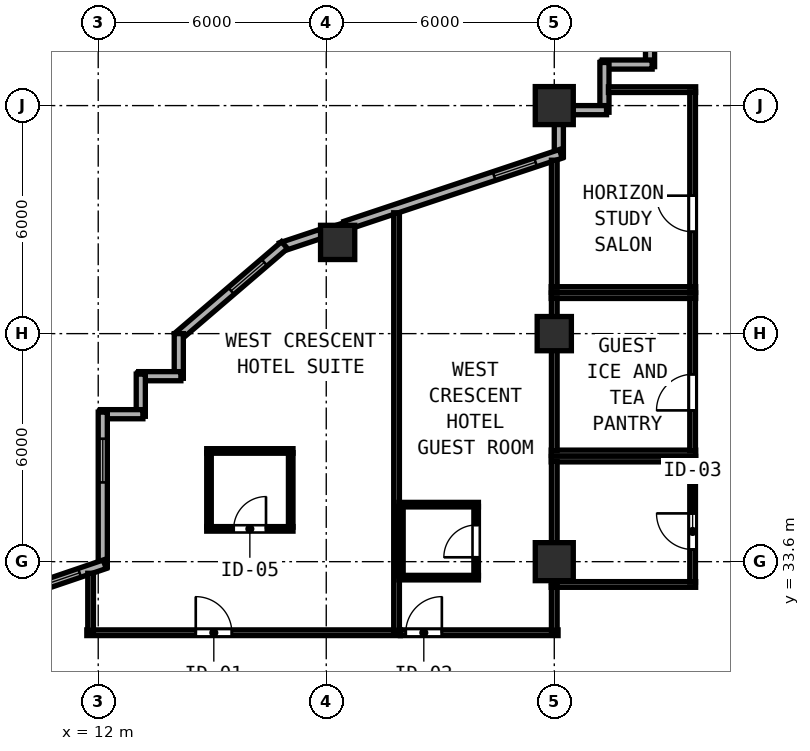
"""IFC4 building model, lengths in metres.
Left out: names, types, materials, properties, quantities, classifications, styles, units other than length and angle.
Written with IfcOpenShell. Run it as: python <this file> out.ifc"""

import sys

from ifc_helpers import new_model, si_unit, direction, frame, frame_2d, origin, origin_2d, place, context, subcontext, project, spatial, rectangle, hollow_rectangle, extrude, element, fill, save


model = new_model("IFC4")
c1 = context("Model", 3, precision=1e-05, world=origin(), true_north=direction((0.0, 1.0)))
c2 = subcontext(c1, "Body", "Model", "MODEL_VIEW")
j1 = project(units=[si_unit("LENGTHUNIT", "METRE"), si_unit("PLANEANGLEUNIT", "RADIAN")], contexts=[c1])
p1 = place(None, origin())
s1 = spatial("IfcSite", under=j1, at=p1, CompositionType="ELEMENT")
p2 = place(p1, origin())
s2 = spatial("IfcBuilding", under=s1, at=p2, CompositionType="ELEMENT")
p3 = place(p2, frame((0.0, 0.0, 106.0)))
s3 = spatial("IfcBuildingStorey", under=s2, at=p3, CompositionType="ELEMENT", Elevation=106.0)
for number, where, z_axis, x_axis in (
    (1, (24.0, 33.6, 0.0), (0.0, 0.0, 1.0), (1.0, 0.0, 0.0)),
    (2, (24.0, 45.6, 0.0), (0.0, 0.0, 1.0), (1.0, 0.0, 0.0)),
):
    element("IfcColumn", number, at=place(p3, frame(where, z_axis=z_axis, x_axis=x_axis)), inside=s3, PredefinedType="COLUMN", context=c2, shape_type="SweptSolid", body=[
        extrude(hollow_rectangle(XDim=1.0, YDim=1.0, WallThickness=0.038, at=origin_2d()), origin(), (0.0, 0.0, 1.0), 3.8),
    ])
for number, where, z_axis, x_axis in (
    (3, (24.0, 39.6, 0.0), (0.0, 0.0, 1.0), (1.0, 0.0, 0.0)),
    (4, (18.3, 42.0, 0.0), (0.0, 0.0, 1.0), (1.0, 0.0, 0.0)),
):
    element("IfcColumn", number, at=place(p3, frame(where, z_axis=z_axis, x_axis=x_axis)), inside=s3, PredefinedType="COLUMN", context=c2, shape_type="SweptSolid", body=[
        extrude(hollow_rectangle(XDim=0.9, YDim=0.9, WallThickness=0.034, at=origin_2d()), origin(), (0.0, 0.0, 1.0), 3.8),
    ])
p4 = place(p3, frame((26.52, 47.995, 0.0), z_axis=(0.0, 0.0, 1.0), x_axis=(0.0, -1.0, 0.0)))
e5 = element("IfcWall", 5, at=p4, inside=s3, PredefinedType="SOLIDWALL", context=c2, shape_type="SweptSolid", body=[
    extrude(rectangle(XDim=1.37, YDim=0.24, at=frame_2d((0.685, 0.0))), origin(), (0.0, 0.0, 1.0), 3.6),
])
for number, where, z_axis, x_axis in (
    (6, (26.575, 46.68, 0.0), (0.0, 0.0, 1.0), (-1.0, 0.0, 0.0)),
    (7, (25.32, 46.735, 0.0), (0.0, 0.0, 1.0), (0.0, -1.0, 0.0)),
):
    element("IfcWall", number, at=place(p3, frame(where, z_axis=z_axis, x_axis=x_axis)), inside=s3, PredefinedType="SOLIDWALL", context=c2, shape_type="SweptSolid", body=[
        extrude(rectangle(XDim=1.31, YDim=0.24, at=frame_2d((0.655, 0.0))), origin(), (0.0, 0.0, 1.0), 3.6),
    ])
p5 = place(p3, frame((25.375, 45.48, 0.0), z_axis=(0.0, 0.0, 1.0), x_axis=(-1.0, 0.0, 0.0)))
e8 = element("IfcWall", 8, at=p5, inside=s3, PredefinedType="SOLIDWALL", context=c2, shape_type="SweptSolid", body=[
    extrude(rectangle(XDim=0.883, YDim=0.24, at=frame_2d((0.441, 0.0))), origin(), (0.0, 0.0, 1.0), 3.6),
])
p6 = place(p3, frame((24.12, 45.108, 0.0), z_axis=(0.0, 0.0, 1.0), x_axis=(0.0, -1.0, 0.0)))
e9 = element("IfcWall", 9, at=p6, inside=s3, PredefinedType="SOLIDWALL", context=c2, shape_type="SweptSolid", body=[
    extrude(rectangle(XDim=0.849, YDim=0.24, at=frame_2d((0.425, 0.0))), origin(), (0.0, 0.0, 1.0), 3.145),
])
p7 = place(p3, frame((24.172, 44.331, 0.0), z_axis=(0.0, 0.0, 1.0), x_axis=(-0.948683298051, -0.316227766017, 0.0)))
e10 = element("IfcWall", 10, at=p7, inside=s3, PredefinedType="SOLIDWALL", context=c2, shape_type="SweptSolid", body=[
    extrude(rectangle(XDim=5.973, YDim=0.24, at=frame_2d((2.987, 0.0))), origin(), (0.0, 0.0, 1.0), 3.145),
])
p8 = place(p7, frame((0.7, 0.0, 0.85)))
e11 = element("IfcOpeningElement", 11, at=p8, cuts=e10, PredefinedType="OPENING", context=c2, shape_type="SweptSolid", body=[
    extrude(rectangle(XDim=1.15, YDim=1.8, at=frame_2d((0.575, 0.9))), frame((0.0, 0.13, 0.0), z_axis=(0.0, -1.0, 0.0), x_axis=(1.0, 0.0, 0.0)), (0.0, 0.0, 1.0), 0.26),
])
p9 = place(p3, frame((17.858, 42.226, 0.0), z_axis=(0.0, 0.0, 1.0), x_axis=(-0.948639166064, -0.316360131194, 0.0)))
e12 = element("IfcWall", 12, at=p9, inside=s3, PredefinedType="SOLIDWALL", context=c2, shape_type="SweptSolid", body=[
    extrude(rectangle(XDim=1.107, YDim=0.24, at=frame_2d((0.553, 0.0))), origin(), (0.0, 0.0, 1.0), 3.6),
])
p10 = place(p3, frame((16.902, 41.929, 0.0), z_axis=(0.0, 0.0, 1.0), x_axis=(-0.759275136126, -0.650769750112, 0.0)))
e13 = element("IfcWall", 13, at=p10, inside=s3, PredefinedType="SOLIDWALL", context=c2, shape_type="SweptSolid", body=[
    extrude(rectangle(XDim=3.719, YDim=0.24, at=frame_2d((1.86, 0.0))), origin(), (0.0, 0.0, 1.0), 3.6),
])
p11 = place(p10, frame((0.7, 0.0, 0.85)))
e14 = element("IfcOpeningElement", 14, at=p11, cuts=e13, PredefinedType="OPENING", context=c2, shape_type="SweptSolid", body=[
    extrude(rectangle(XDim=1.15, YDim=1.8, at=frame_2d((0.575, 0.9))), frame((0.0, 0.13, 0.0), z_axis=(0.0, -1.0, 0.0), x_axis=(1.0, 0.0, 0.0)), (0.0, 0.0, 1.0), 0.26),
])
p12 = place(p3, frame((14.12, 39.6, 0.0), z_axis=(0.0, 0.0, 1.0), x_axis=(0.0, -1.0, 0.0)))
e15 = element("IfcWall", 15, at=p12, inside=s3, PredefinedType="SOLIDWALL", context=c2, shape_type="SweptSolid", body=[
    extrude(rectangle(XDim=1.175, YDim=0.24, at=frame_2d((0.587, 0.0))), origin(), (0.0, 0.0, 1.0), 3.6),
])
p13 = place(p3, frame((14.175, 38.48, 0.0), z_axis=(0.0, 0.0, 1.0), x_axis=(-1.0, 0.0, 0.0)))
e16 = element("IfcWall", 16, at=p13, inside=s3, PredefinedType="SOLIDWALL", context=c2, shape_type="SweptSolid", body=[
    extrude(rectangle(XDim=1.11, YDim=0.24, at=frame_2d((0.555, 0.0))), origin(), (0.0, 0.0, 1.0), 3.6),
])
p14 = place(p3, frame((13.12, 38.535, 0.0), z_axis=(0.0, 0.0, 1.0), x_axis=(0.0, -1.0, 0.0)))
e17 = element("IfcWall", 17, at=p14, inside=s3, PredefinedType="SOLIDWALL", context=c2, shape_type="SweptSolid", body=[
    extrude(rectangle(XDim=1.11, YDim=0.24, at=frame_2d((0.555, 0.0))), origin(), (0.0, 0.0, 1.0), 3.6),
])
p15 = place(p3, frame((13.175, 37.48, 0.0), z_axis=(0.0, 0.0, 1.0), x_axis=(-1.0, 0.0, 0.0)))
e18 = element("IfcWall", 18, at=p15, inside=s3, PredefinedType="SOLIDWALL", context=c2, shape_type="SweptSolid", body=[
    extrude(rectangle(XDim=1.11, YDim=0.24, at=frame_2d((0.555, 0.0))), origin(), (0.0, 0.0, 1.0), 3.6),
])
p16 = place(p3, frame((12.12, 37.535, 0.0), z_axis=(0.0, 0.0, 1.0), x_axis=(0.0, -1.0, 0.0)))
e19 = element("IfcWall", 19, at=p16, inside=s3, PredefinedType="SOLIDWALL", context=c2, shape_type="SweptSolid", body=[
    extrude(rectangle(XDim=4.076, YDim=0.24, at=frame_2d((2.038, 0.0))), origin(), (0.0, 0.0, 1.0), 3.6),
])
p17 = place(p16, frame((0.7, 0.0, 0.85)))
e20 = element("IfcOpeningElement", 20, at=p17, cuts=e19, PredefinedType="OPENING", context=c2, shape_type="SweptSolid", body=[
    extrude(rectangle(XDim=1.15, YDim=1.8, at=frame_2d((0.575, 0.9))), frame((0.0, 0.13, 0.0), z_axis=(0.0, -1.0, 0.0), x_axis=(1.0, 0.0, 0.0)), (0.0, 0.0, 1.0), 0.26),
])
p18 = place(p3, frame((12.172, 33.532, 0.0), z_axis=(0.0, 0.0, 1.0), x_axis=(-0.946792852546, -0.321843586805, 0.0)))
e21 = element("IfcWall", 21, at=p18, inside=s3, PredefinedType="SOLIDWALL", context=c2, shape_type="SweptSolid", body=[
    extrude(rectangle(XDim=7.622, YDim=0.24, at=frame_2d((3.811, 0.0))), origin(), (0.0, 0.0, 1.0), 3.6),
])
p19 = place(p18, frame((0.7, 0.0, 0.85)))
e22 = element("IfcOpeningElement", 22, at=p19, cuts=e21, PredefinedType="OPENING", context=c2, shape_type="SweptSolid", body=[
    extrude(rectangle(XDim=1.15, YDim=1.8, at=frame_2d((0.575, 0.9))), frame((0.0, 0.13, 0.0), z_axis=(0.0, -1.0, 0.0), x_axis=(1.0, 0.0, 0.0)), (0.0, 0.0, 1.0), 0.26),
])
for number, where, z_axis, x_axis in (
    (23, (23.92, 36.3, 0.0), (0.0, 0.0, 1.0), (1.0, 0.0, 0.0)),
    (24, (23.92, 33.0, 0.0), (0.0, 0.0, 1.0), (1.0, 0.0, 0.0)),
):
    element("IfcWall", number, at=place(p3, frame(where, z_axis=z_axis, x_axis=x_axis)), inside=s3, PredefinedType="PARTITIONING", context=c2, shape_type="SweptSolid", body=[
        extrude(rectangle(XDim=3.8, YDim=0.15, at=frame_2d((1.9, 0.0))), origin(), (0.0, 0.0, 1.0), 3.6),
    ])
p20 = place(p3, frame((24.0, 33.06, 0.0), z_axis=(0.0, 0.0, 1.0), x_axis=(0.0, 1.0, 0.0)))
e25 = element("IfcWall", 25, at=p20, inside=s3, PredefinedType="PARTITIONING", context=c2, shape_type="SweptSolid", body=[
    extrude(rectangle(XDim=3.18, YDim=0.15, at=frame_2d((1.59, 0.0))), origin(), (0.0, 0.0, 1.0), 3.145),
])
p21 = place(p3, frame((27.64, 33.06, 0.0), z_axis=(0.0, 0.0, 1.0), x_axis=(0.0, 1.0, 0.0)))
e26 = element("IfcWall", 26, at=p21, inside=s3, PredefinedType="PARTITIONING", context=c2, shape_type="SweptSolid", body=[
    extrude(rectangle(XDim=3.18, YDim=0.15, at=frame_2d((1.59, 0.0))), origin(), (0.0, 0.0, 1.0), 3.6),
])
p22 = place(p21, frame((1.81, 0.0, 0.0), z_axis=(0.0, 0.0, 1.0), x_axis=(-1.0, 0.0, 0.0)))
e27 = element("IfcOpeningElement", 27, at=p22, cuts=e26, PredefinedType="OPENING", context=c2, shape_type="SweptSolid", body=[
    extrude(rectangle(XDim=0.95, YDim=2.12, at=frame_2d((0.475, 1.06))), frame((0.0, 0.085, 0.0), z_axis=(0.0, -1.0, 0.0), x_axis=(1.0, 0.0, 0.0)), (0.0, 0.0, 1.0), 0.17),
])
for number, where, z_axis, x_axis in (
    (28, (23.92, 40.6, 0.0), (0.0, 0.0, 1.0), (1.0, 0.0, 0.0)),
    (29, (23.92, 36.46, 0.0), (0.0, 0.0, 1.0), (1.0, 0.0, 0.0)),
):
    element("IfcWall", number, at=place(p3, frame(where, z_axis=z_axis, x_axis=x_axis)), inside=s3, PredefinedType="PARTITIONING", context=c2, shape_type="SweptSolid", body=[
        extrude(rectangle(XDim=3.8, YDim=0.15, at=frame_2d((1.9, 0.0))), origin(), (0.0, 0.0, 1.0), 3.6),
    ])
p23 = place(p3, frame((24.0, 36.52, 0.0), z_axis=(0.0, 0.0, 1.0), x_axis=(0.0, 1.0, 0.0)))
e30 = element("IfcWall", 30, at=p23, inside=s3, PredefinedType="PARTITIONING", context=c2, shape_type="SweptSolid", body=[
    extrude(rectangle(XDim=4.02, YDim=0.15, at=frame_2d((2.01, 0.0))), origin(), (0.0, 0.0, 1.0), 3.145),
])
p24 = place(p3, frame((27.64, 36.52, 0.0), z_axis=(0.0, 0.0, 1.0), x_axis=(0.0, 1.0, 0.0)))
e31 = element("IfcWall", 31, at=p24, inside=s3, PredefinedType="PARTITIONING", context=c2, shape_type="SweptSolid", body=[
    extrude(rectangle(XDim=4.02, YDim=0.15, at=frame_2d((2.01, 0.0))), origin(), (0.0, 0.0, 1.0), 3.6),
])
p25 = place(p24, frame((2.01, 0.0, 0.0), z_axis=(0.0, 0.0, 1.0), x_axis=(-1.0, 0.0, 0.0)))
e32 = element("IfcOpeningElement", 32, at=p25, cuts=e31, PredefinedType="OPENING", context=c2, shape_type="SweptSolid", body=[
    extrude(rectangle(XDim=0.95, YDim=2.12, at=frame_2d((0.475, 1.06))), frame((0.0, 0.085, 0.0), z_axis=(0.0, -1.0, 0.0), x_axis=(1.0, 0.0, 0.0)), (0.0, 0.0, 1.0), 0.17),
])
p26 = place(p3, frame((25.425, 46.02, 0.0), z_axis=(0.0, 0.0, 1.0), x_axis=(1.0, 0.0, 0.0)))
e33 = element("IfcWall", 33, at=p26, inside=s3, PredefinedType="PARTITIONING", context=c2, shape_type="SweptSolid", body=[
    extrude(rectangle(XDim=2.295, YDim=0.15, at=frame_2d((1.147, 0.0))), origin(), (0.0, 0.0, 1.0), 3.6),
])
p27 = place(p3, frame((23.92, 40.76, 0.0), z_axis=(0.0, 0.0, 1.0), x_axis=(1.0, 0.0, 0.0)))
e34 = element("IfcWall", 34, at=p27, inside=s3, PredefinedType="PARTITIONING", context=c2, shape_type="SweptSolid", body=[
    extrude(rectangle(XDim=3.8, YDim=0.15, at=frame_2d((1.9, 0.0))), origin(), (0.0, 0.0, 1.0), 3.6),
])
p28 = place(p3, frame((24.0, 40.82, 0.0), z_axis=(0.0, 0.0, 1.0), x_axis=(0.0, 1.0, 0.0)))
e35 = element("IfcWall", 35, at=p28, inside=s3, PredefinedType="PARTITIONING", context=c2, shape_type="SweptSolid", body=[
    extrude(rectangle(XDim=3.343, YDim=0.15, at=frame_2d((1.671, 0.0))), origin(), (0.0, 0.0, 1.0), 3.145),
])
p29 = place(p3, frame((27.64, 40.82, 0.0), z_axis=(0.0, 0.0, 1.0), x_axis=(0.0, 1.0, 0.0)))
e36 = element("IfcWall", 36, at=p29, inside=s3, PredefinedType="PARTITIONING", context=c2, shape_type="SweptSolid", body=[
    extrude(rectangle(XDim=5.14, YDim=0.15, at=frame_2d((2.57, 0.0))), origin(), (0.0, 0.0, 1.0), 3.6),
])
p30 = place(p29, frame((2.41, 0.0, 0.0), z_axis=(0.0, 0.0, 1.0), x_axis=(-1.0, 0.0, 0.0)))
e37 = element("IfcOpeningElement", 37, at=p30, cuts=e36, PredefinedType="OPENING", context=c2, shape_type="SweptSolid", body=[
    extrude(rectangle(XDim=0.95, YDim=2.12, at=frame_2d((0.475, 1.06))), frame((0.0, 0.085, 0.0), z_axis=(0.0, -1.0, 0.0), x_axis=(1.0, 0.0, 0.0)), (0.0, 0.0, 1.0), 0.17),
])
p31 = place(p3, frame((11.7, 31.73, 0.0), z_axis=(0.0, 0.0, 1.0), x_axis=(1.0, 0.0, 0.0)))
e38 = element("IfcWall", 38, at=p31, inside=s3, PredefinedType="PARTITIONING", context=c2, shape_type="SweptSolid", body=[
    extrude(rectangle(XDim=8.25, YDim=0.15, at=frame_2d((4.125, 0.0))), origin(), (0.0, 0.0, 1.0), 3.6),
])
p32 = place(p31, frame((2.866, 0.0, 0.0)))
e39 = element("IfcOpeningElement", 39, at=p32, cuts=e38, PredefinedType="OPENING", context=c2, shape_type="SweptSolid", body=[
    extrude(rectangle(XDim=0.95, YDim=2.18, at=frame_2d((0.475, 1.09))), frame((0.0, 0.085, 0.0), z_axis=(0.0, -1.0, 0.0), x_axis=(1.0, 0.0, 0.0)), (0.0, 0.0, 1.0), 0.17),
])
p33 = place(p3, frame((11.8, 31.79, 0.0), z_axis=(0.0, 0.0, 1.0), x_axis=(0.0, 1.0, 0.0)))
e40 = element("IfcWall", 40, at=p33, inside=s3, PredefinedType="PARTITIONING", context=c2, shape_type="SweptSolid", body=[
    extrude(rectangle(XDim=1.504, YDim=0.15, at=frame_2d((0.752, 0.0))), origin(), (0.0, 0.0, 1.0), 3.6),
])
p34 = place(p3, frame((19.85, 31.79, 0.0), z_axis=(0.0, 0.0, 1.0), x_axis=(0.0, 1.0, 0.0)))
e41 = element("IfcWall", 41, at=p34, inside=s3, PredefinedType="PARTITIONING", context=c2, shape_type="SweptSolid", body=[
    extrude(rectangle(XDim=10.99, YDim=0.15, at=frame_2d((5.495, 0.0))), origin(), (0.0, 0.0, 1.0), 3.6),
])
p35 = place(p3, frame((14.855, 36.513, 0.0), z_axis=(0.0, 0.0, 1.0), x_axis=(1.0, 0.0, 0.0)))
e42 = element("IfcWall", 42, at=p35, inside=s3, PredefinedType="PARTITIONING", context=c2, shape_type="SweptSolid", body=[
    extrude(rectangle(XDim=2.27, YDim=0.12, at=frame_2d((1.135, 0.0))), origin(), (0.0, 0.0, 1.0), 3.6),
])
p36 = place(p3, frame((14.855, 34.463, 0.0), z_axis=(0.0, 0.0, 1.0), x_axis=(1.0, 0.0, 0.0)))
e43 = element("IfcWall", 43, at=p36, inside=s3, PredefinedType="PARTITIONING", context=c2, shape_type="SweptSolid", body=[
    extrude(rectangle(XDim=2.27, YDim=0.12, at=frame_2d((1.135, 0.0))), origin(), (0.0, 0.0, 1.0), 3.6),
])
p37 = place(p36, frame((0.71, 0.0, 0.0)))
e44 = element("IfcOpeningElement", 44, at=p37, cuts=e43, PredefinedType="OPENING", context=c2, shape_type="SweptSolid", body=[
    extrude(rectangle(XDim=0.85, YDim=2.1, at=frame_2d((0.425, 1.05))), frame((0.0, 0.07, 0.0), z_axis=(0.0, -1.0, 0.0), x_axis=(1.0, 0.0, 0.0)), (0.0, 0.0, 1.0), 0.14),
])
for number, where, z_axis, x_axis in (
    (45, (14.915, 34.508, 0.0), (0.0, 0.0, 1.0), (0.0, 1.0, 0.0)),
    (46, (17.065, 34.508, 0.0), (0.0, 0.0, 1.0), (0.0, 1.0, 0.0)),
):
    element("IfcWall", number, at=place(p3, frame(where, z_axis=z_axis, x_axis=x_axis)), inside=s3, PredefinedType="PARTITIONING", context=c2, shape_type="SweptSolid", body=[
        extrude(rectangle(XDim=1.96, YDim=0.12, at=frame_2d((0.98, 0.0))), origin(), (0.0, 0.0, 1.0), 3.6),
    ])
p38 = place(p3, frame((19.952, 31.73, 0.0), z_axis=(0.0, 0.0, 1.0), x_axis=(1.0, 0.0, 0.0)))
e47 = element("IfcWall", 47, at=p38, inside=s3, PredefinedType="PARTITIONING", context=c2, shape_type="SweptSolid", body=[
    extrude(rectangle(XDim=4.148, YDim=0.15, at=frame_2d((2.074, 0.0))), origin(), (0.0, 0.0, 1.0), 3.6),
])
p39 = place(p38, frame((0.14, 0.0, 0.0)))
e48 = element("IfcOpeningElement", 48, at=p39, cuts=e47, PredefinedType="OPENING", context=c2, shape_type="SweptSolid", body=[
    extrude(rectangle(XDim=0.95, YDim=2.15, at=frame_2d((0.475, 1.075))), frame((0.0, 0.085, 0.0), z_axis=(0.0, -1.0, 0.0), x_axis=(1.0, 0.0, 0.0)), (0.0, 0.0, 1.0), 0.17),
])
p40 = place(p3, frame((24.0, 31.79, 0.0), z_axis=(0.0, 0.0, 1.0), x_axis=(0.0, 1.0, 0.0)))
e49 = element("IfcWall", 49, at=p40, inside=s3, PredefinedType="PARTITIONING", context=c2, shape_type="SweptSolid", body=[
    extrude(rectangle(XDim=1.15, YDim=0.15, at=frame_2d((0.575, 0.0))), origin(), (0.0, 0.0, 1.0), 3.145),
])
for number, where, z_axis, x_axis in (
    (50, (19.91, 35.1, 0.0), (0.0, 0.0, 1.0), (1.0, 0.0, 0.0)),
    (51, (19.91, 33.18, 0.0), (0.0, 0.0, 1.0), (1.0, 0.0, 0.0)),
):
    element("IfcWall", number, at=place(p3, frame(where, z_axis=z_axis, x_axis=x_axis)), inside=s3, PredefinedType="PARTITIONING", context=c2, shape_type="SweptSolid", body=[
        extrude(rectangle(XDim=2.094, YDim=0.12, at=frame_2d((1.047, 0.0))), origin(), (0.0, 0.0, 1.0), 3.6),
    ])
p41 = place(p3, frame((19.964, 33.225, 0.0), z_axis=(0.0, 0.0, 1.0), x_axis=(0.0, 1.0, 0.0)))
e52 = element("IfcWall", 52, at=p41, inside=s3, PredefinedType="PARTITIONING", context=c2, shape_type="SweptSolid", body=[
    extrude(rectangle(XDim=1.83, YDim=0.12, at=frame_2d((0.915, 0.0))), origin(), (0.0, 0.0, 1.0), 3.6),
])
p42 = place(p3, frame((21.944, 33.225, 0.0), z_axis=(0.0, 0.0, 1.0), x_axis=(0.0, 1.0, 0.0)))
e53 = element("IfcWall", 53, at=p42, inside=s3, PredefinedType="PARTITIONING", context=c2, shape_type="SweptSolid", body=[
    extrude(rectangle(XDim=1.83, YDim=0.12, at=frame_2d((0.915, 0.0))), origin(), (0.0, 0.0, 1.0), 3.6),
])
p43 = place(p42, frame((0.49, 0.0, 0.0)))
e54 = element("IfcOpeningElement", 54, at=p43, cuts=e53, PredefinedType="OPENING", context=c2, shape_type="SweptSolid", body=[
    extrude(rectangle(XDim=0.85, YDim=2.1, at=frame_2d((0.425, 1.05))), frame((0.0, 0.07, 0.0), z_axis=(0.0, -1.0, 0.0), x_axis=(1.0, 0.0, 0.0)), (0.0, 0.0, 1.0), 0.14),
])
p44 = place(p8, origin())
e55 = element("IfcWindow", 55, at=p44, inside=s3, PartitioningType="SINGLE_PANEL", PredefinedType="WINDOW", context=c2, shape_type="SweptSolid", body=[
    extrude(rectangle(XDim=1.15, YDim=1.8, at=frame_2d((0.575, 0.9))), frame((0.0, 0.03, 0.0), z_axis=(0.0, -1.0, 0.0), x_axis=(1.0, 0.0, 0.0)), (0.0, 0.0, 1.0), 0.06),
])
fill(e11, e55)
p45 = place(p11, origin())
e56 = element("IfcWindow", 56, at=p45, inside=s3, PartitioningType="SINGLE_PANEL", PredefinedType="WINDOW", context=c2, shape_type="SweptSolid", body=[
    extrude(rectangle(XDim=1.15, YDim=1.8, at=frame_2d((0.575, 0.9))), frame((0.0, 0.03, 0.0), z_axis=(0.0, -1.0, 0.0), x_axis=(1.0, 0.0, 0.0)), (0.0, 0.0, 1.0), 0.06),
])
fill(e14, e56)
p46 = place(p17, origin())
e57 = element("IfcWindow", 57, at=p46, inside=s3, PartitioningType="SINGLE_PANEL", PredefinedType="WINDOW", context=c2, shape_type="SweptSolid", body=[
    extrude(rectangle(XDim=1.15, YDim=1.8, at=frame_2d((0.575, 0.9))), frame((0.0, 0.03, 0.0), z_axis=(0.0, -1.0, 0.0), x_axis=(1.0, 0.0, 0.0)), (0.0, 0.0, 1.0), 0.06),
])
fill(e20, e57)
p47 = place(p19, origin())
e58 = element("IfcWindow", 58, at=p47, inside=s3, PartitioningType="SINGLE_PANEL", PredefinedType="WINDOW", context=c2, shape_type="SweptSolid", body=[
    extrude(rectangle(XDim=1.15, YDim=1.8, at=frame_2d((0.575, 0.9))), frame((0.0, 0.03, 0.0), z_axis=(0.0, -1.0, 0.0), x_axis=(1.0, 0.0, 0.0)), (0.0, 0.0, 1.0), 0.06),
])
fill(e22, e58)
p48 = place(p22, origin())
e59 = element("IfcDoor", 59, at=p48, inside=s3, OperationType="SINGLE_SWING_LEFT", PredefinedType="DOOR", context=c2, shape_type="SweptSolid", body=[
    extrude(rectangle(XDim=0.95, YDim=2.12, at=frame_2d((0.475, 1.06))), frame((0.0, 0.025, 0.0), z_axis=(0.0, -1.0, 0.0), x_axis=(1.0, 0.0, 0.0)), (0.0, 0.0, 1.0), 0.05),
])
fill(e27, e59)
p49 = place(p25, origin())
e60 = element("IfcDoor", 60, at=p49, inside=s3, OperationType="SINGLE_SWING_RIGHT", PredefinedType="DOOR", context=c2, shape_type="SweptSolid", body=[
    extrude(rectangle(XDim=0.95, YDim=2.12, at=frame_2d((0.475, 1.06))), frame((0.0, 0.025, 0.0), z_axis=(0.0, -1.0, 0.0), x_axis=(1.0, 0.0, 0.0)), (0.0, 0.0, 1.0), 0.05),
])
fill(e32, e60)
p50 = place(p30, origin())
e61 = element("IfcDoor", 61, at=p50, inside=s3, OperationType="SINGLE_SWING_LEFT", PredefinedType="DOOR", context=c2, shape_type="SweptSolid", body=[
    extrude(rectangle(XDim=0.95, YDim=2.12, at=frame_2d((0.475, 1.06))), frame((0.0, 0.025, 0.0), z_axis=(0.0, -1.0, 0.0), x_axis=(1.0, 0.0, 0.0)), (0.0, 0.0, 1.0), 0.05),
])
fill(e37, e61)
p51 = place(p32, origin())
e62 = element("IfcDoor", 62, at=p51, inside=s3, OperationType="SINGLE_SWING_LEFT", PredefinedType="DOOR", context=c2, shape_type="SweptSolid", body=[
    extrude(rectangle(XDim=0.95, YDim=2.18, at=frame_2d((0.475, 1.09))), frame((0.0, 0.025, 0.0), z_axis=(0.0, -1.0, 0.0), x_axis=(1.0, 0.0, 0.0)), (0.0, 0.0, 1.0), 0.05),
])
fill(e39, e62)
p52 = place(p37, origin())
e63 = element("IfcDoor", 63, at=p52, inside=s3, OperationType="SINGLE_SWING_RIGHT", PredefinedType="DOOR", context=c2, shape_type="SweptSolid", body=[
    extrude(rectangle(XDim=0.85, YDim=2.1, at=frame_2d((0.425, 1.05))), frame((0.0, 0.025, 0.0), z_axis=(0.0, -1.0, 0.0), x_axis=(1.0, 0.0, 0.0)), (0.0, 0.0, 1.0), 0.05),
])
fill(e44, e63)
p53 = place(p39, origin())
e64 = element("IfcDoor", 64, at=p53, inside=s3, OperationType="SINGLE_SWING_RIGHT", PredefinedType="DOOR", context=c2, shape_type="SweptSolid", body=[
    extrude(rectangle(XDim=0.95, YDim=2.15, at=frame_2d((0.475, 1.075))), frame((0.0, 0.025, 0.0), z_axis=(0.0, -1.0, 0.0), x_axis=(1.0, 0.0, 0.0)), (0.0, 0.0, 1.0), 0.05),
])
fill(e48, e64)
p54 = place(p43, origin())
e65 = element("IfcDoor", 65, at=p54, inside=s3, OperationType="SINGLE_SWING_LEFT", PredefinedType="DOOR", context=c2, shape_type="SweptSolid", body=[
    extrude(rectangle(XDim=0.85, YDim=2.1, at=frame_2d((0.425, 1.05))), frame((0.0, 0.025, 0.0), z_axis=(0.0, -1.0, 0.0), x_axis=(1.0, 0.0, 0.0)), (0.0, 0.0, 1.0), 0.05),
])
fill(e54, e65)
save(model, sys.argv[1])
